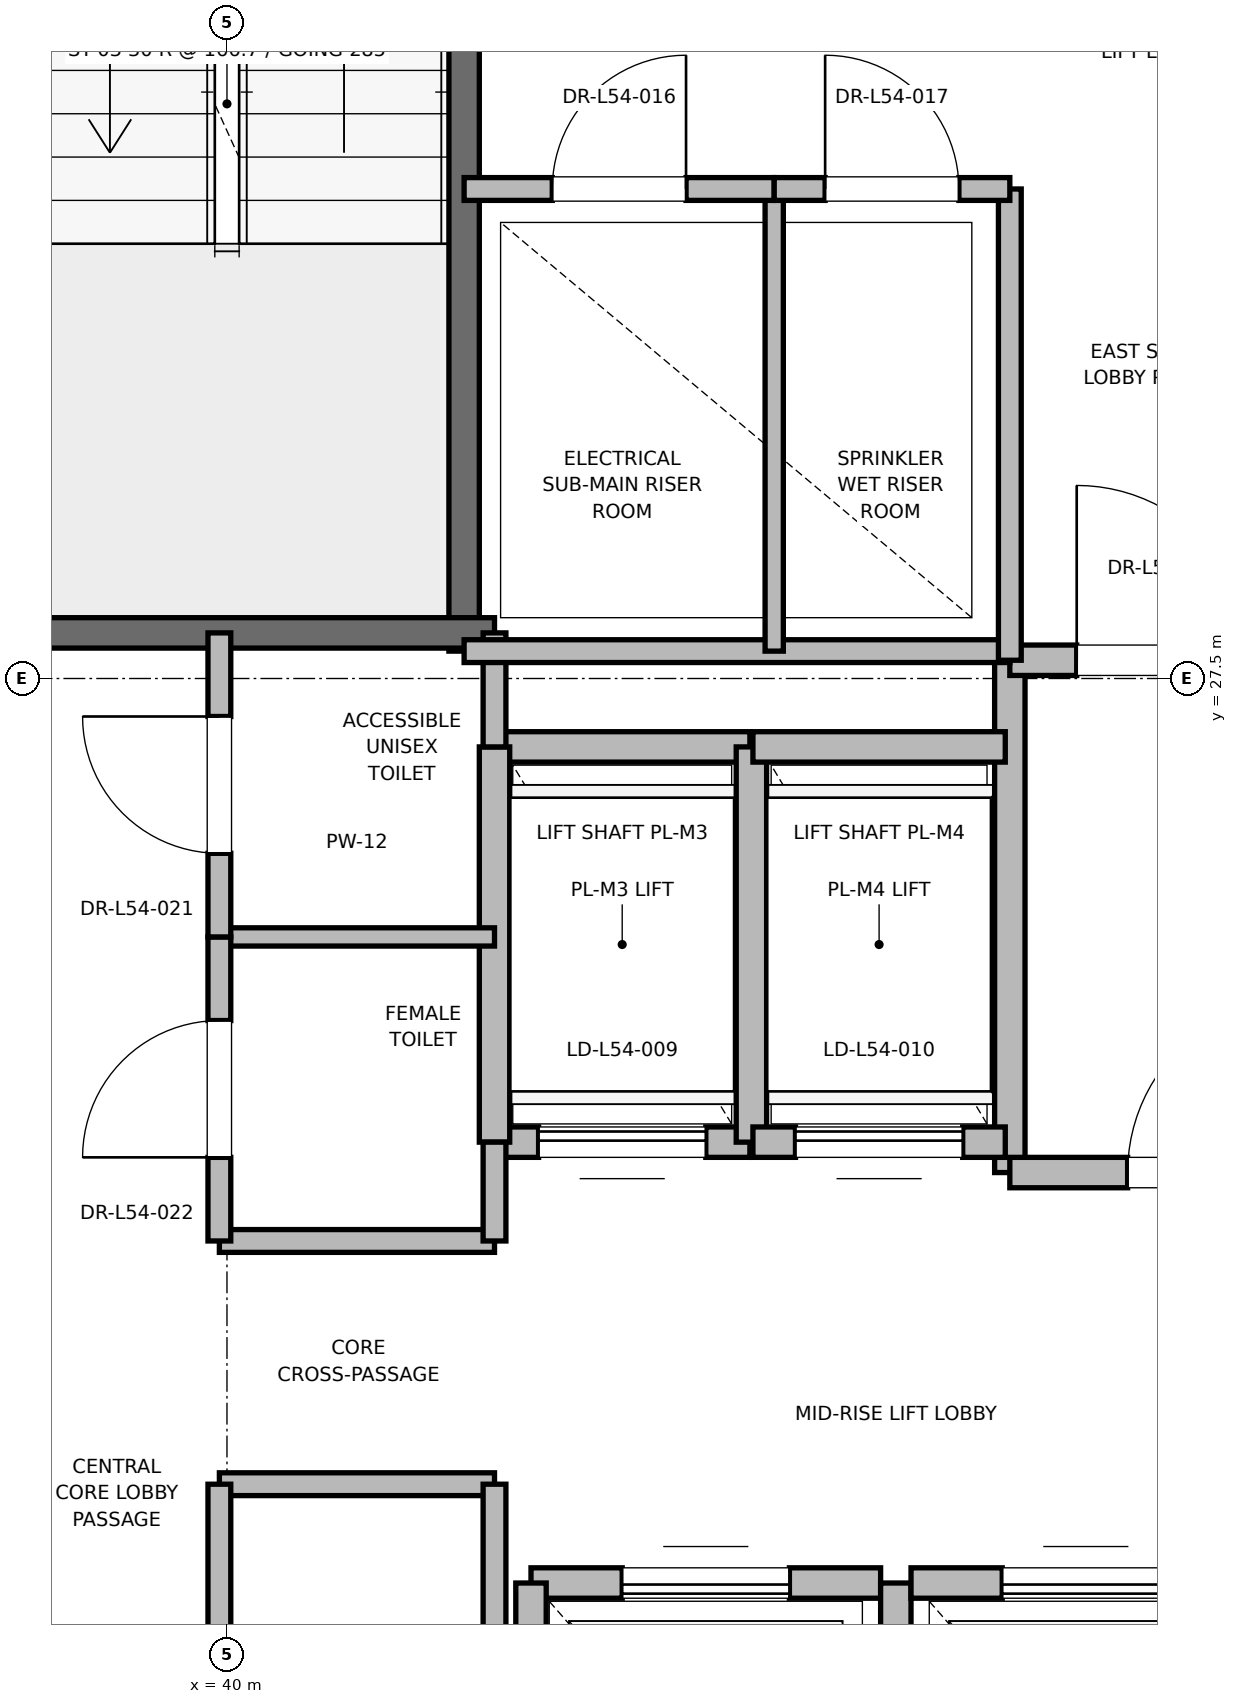
"""IFC4 building model, lengths in metres.
Left out: names, types, materials, properties, quantities, classifications, styles, units other than length and angle.
Written with IfcOpenShell. Run it as: python <this file> out.ifc"""

import sys

from ifc_helpers import new_model, si_unit, direction, frame, frame_2d, origin, place, context, subcontext, project, spatial, rectangle, extrude, element, fill, save


model = new_model("IFC4")
c1 = context("Model", 3, precision=1e-05, world=origin(), true_north=direction((0.0, 1.0)))
c2 = subcontext(c1, "Body", "Model", "MODEL_VIEW")
j1 = project(units=[si_unit("LENGTHUNIT", "METRE"), si_unit("PLANEANGLEUNIT", "RADIAN")], contexts=[c1])
p1 = place(None, origin())
s1 = spatial("IfcSite", under=j1, at=p1, CompositionType="ELEMENT")
p2 = place(p1, origin())
s2 = spatial("IfcBuilding", under=s1, at=p2, CompositionType="ELEMENT")
p3 = place(p2, frame((0.0, 0.0, 233.2)))
s3 = spatial("IfcBuildingStorey", under=s2, at=p3, CompositionType="ELEMENT", Elevation=233.2)
p4 = place(p3, frame((41.56, 27.68, 0.0), z_axis=(0.0, 0.0, 1.0), x_axis=(0.0, 1.0, 0.0)))
e1 = element("IfcWall", 1, at=p4, inside=s3, PredefinedType="SOLIDWALL", context=c2, shape_type="SweptSolid", body=[
    extrude(rectangle(XDim=8.57, YDim=0.2, at=frame_2d((4.285, 0.0))), origin(), (0.0, 0.0, 1.0), 4.7),
])
p5 = place(p3, frame((38.44, 27.8, 0.0), z_axis=(0.0, 0.0, 1.0), x_axis=(1.0, 0.0, 0.0)))
e2 = element("IfcWall", 2, at=p5, inside=s3, PredefinedType="SOLIDWALL", context=c2, shape_type="SweptSolid", body=[
    extrude(rectangle(XDim=3.32, YDim=0.2, at=frame_2d((1.66, 0.0))), origin(), (0.0, 0.0, 1.0), 4.7),
])
p6 = place(p3, frame((45.15, 24.25, 0.0), z_axis=(0.0, 0.0, 1.0), x_axis=(0.0, 1.0, 0.0)))
e3 = element("IfcWall", 3, at=p6, inside=s3, PredefinedType="PARTITIONING", context=c2, shape_type="SweptSolid", body=[
    extrude(rectangle(XDim=3.37, YDim=0.2, at=frame_2d((1.685, 0.0))), origin(), (0.0, 0.0, 1.0), 4.7),
])
p7 = place(p3, frame((45.15, 24.25, 0.0), z_axis=(0.0, 0.0, 1.0), x_axis=(1.0, 0.0, 0.0)))
e4 = element("IfcWall", 4, at=p7, inside=s3, PredefinedType="PARTITIONING", context=c2, shape_type="SweptSolid", body=[
    extrude(rectangle(XDim=2.7, YDim=0.2, at=frame_2d((1.35, 0.0))), origin(), (0.0, 0.0, 1.0), 4.7),
])
p8 = place(p7, frame((0.775, 0.0, 0.0)))
e5 = element("IfcOpeningElement", 5, at=p8, cuts=e4, PredefinedType="OPENING", context=c2, shape_type="SweptSolid", body=[
    extrude(rectangle(XDim=1.15, YDim=2.2, at=frame_2d((0.575, 1.1))), frame((0.0, 0.1, 0.0), z_axis=(0.0, -1.0, 0.0), x_axis=(1.0, 0.0, 0.0)), (0.0, 0.0, 1.0), 0.2),
])
p9 = place(p3, frame((45.15, 27.62, 0.0), z_axis=(0.0, 0.0, 1.0), x_axis=(1.0, 0.0, 0.0)))
e6 = element("IfcWall", 6, at=p9, inside=s3, PredefinedType="PARTITIONING", context=c2, shape_type="SweptSolid", body=[
    extrude(rectangle(XDim=2.03, YDim=0.2, at=frame_2d((1.015, 0.0))), origin(), (0.0, 0.0, 1.0), 4.7),
])
p10 = place(p9, frame((0.44, 0.0, 0.0)))
e7 = element("IfcOpeningElement", 7, at=p10, cuts=e6, PredefinedType="OPENING", context=c2, shape_type="SweptSolid", body=[
    extrude(rectangle(XDim=1.15, YDim=2.2, at=frame_2d((0.575, 1.1))), frame((0.0, 0.1, 0.0), z_axis=(0.0, -1.0, 0.0), x_axis=(1.0, 0.0, 0.0)), (0.0, 0.0, 1.0), 0.2),
])
p11 = place(p3, frame((44.3, 21.55, 0.0), z_axis=(0.0, 0.0, 1.0), x_axis=(-1.0, 0.0, 0.0)))
e8 = element("IfcWall", 8, at=p11, inside=s3, PredefinedType="SOLIDWALL", context=c2, shape_type="SweptSolid", body=[
    extrude(rectangle(XDim=2.3, YDim=0.2, at=frame_2d((1.15, 0.0))), origin(), (0.0, 0.0, 1.0), 4.7),
])
p12 = place(p11, frame((0.6, 0.0, 0.0)))
e9 = element("IfcOpeningElement", 9, at=p12, cuts=e8, PredefinedType="OPENING", context=c2, shape_type="SweptSolid", body=[
    extrude(rectangle(XDim=1.1, YDim=2.2, at=frame_2d((0.55, 1.1))), frame((0.0, 0.1, 0.0), z_axis=(0.0, -1.0, 0.0), x_axis=(1.0, 0.0, 0.0)), (0.0, 0.0, 1.0), 0.2),
])
p13 = place(p3, frame((42.0, 21.55, 0.0), z_axis=(0.0, 0.0, 1.0), x_axis=(0.0, -1.0, 0.0)))
e10 = element("IfcWall", 10, at=p13, inside=s3, PredefinedType="SOLIDWALL", context=c2, shape_type="SweptSolid", body=[
    extrude(rectangle(XDim=2.6, YDim=0.2, at=frame_2d((1.3, 0.0))), origin(), (0.0, 0.0, 1.0), 3.68),
])
p14 = place(p3, frame((44.4, 18.95, 0.0), z_axis=(0.0, 0.0, 1.0), x_axis=(0.0, 1.0, 0.0)))
e11 = element("IfcWall", 11, at=p14, inside=s3, PredefinedType="SOLIDWALL", context=c2, shape_type="SweptSolid", body=[
    extrude(rectangle(XDim=2.6, YDim=0.2, at=frame_2d((1.3, 0.0))), origin(), (0.0, 0.0, 1.0), 4.7),
])
p15 = place(p3, frame((46.8, 21.55, 0.0), z_axis=(0.0, 0.0, 1.0), x_axis=(-1.0, 0.0, 0.0)))
e12 = element("IfcWall", 12, at=p15, inside=s3, PredefinedType="SOLIDWALL", context=c2, shape_type="SweptSolid", body=[
    extrude(rectangle(XDim=2.3, YDim=0.2, at=frame_2d((1.15, 0.0))), origin(), (0.0, 0.0, 1.0), 4.7),
])
p16 = place(p15, frame((0.6, 0.0, 0.0)))
e13 = element("IfcOpeningElement", 13, at=p16, cuts=e12, PredefinedType="OPENING", context=c2, shape_type="SweptSolid", body=[
    extrude(rectangle(XDim=1.1, YDim=2.2, at=frame_2d((0.55, 1.1))), frame((0.0, 0.1, 0.0), z_axis=(0.0, -1.0, 0.0), x_axis=(1.0, 0.0, 0.0)), (0.0, 0.0, 1.0), 0.2),
])
p17 = place(p3, frame((41.76, 24.45, 0.0), z_axis=(0.0, 0.0, 1.0), x_axis=(1.0, 0.0, 0.0)))
e14 = element("IfcWall", 14, at=p17, inside=s3, PredefinedType="SOLIDWALL", context=c2, shape_type="SweptSolid", body=[
    extrude(rectangle(XDim=1.68, YDim=0.2, at=frame_2d((0.84, 0.0))), origin(), (0.0, 0.0, 1.0), 4.7),
])
p18 = place(p17, frame((0.29, 0.0, 0.0)))
e15 = element("IfcOpeningElement", 15, at=p18, cuts=e14, PredefinedType="OPENING", context=c2, shape_type="SweptSolid", body=[
    extrude(rectangle(XDim=1.1, YDim=2.2, at=frame_2d((0.55, 1.1))), frame((0.0, 0.1, 0.0), z_axis=(0.0, -1.0, 0.0), x_axis=(1.0, 0.0, 0.0)), (0.0, 0.0, 1.0), 0.2),
])
p19 = place(p3, frame((43.44, 27.05, 0.0), z_axis=(0.0, 0.0, 1.0), x_axis=(-1.0, 0.0, 0.0)))
e16 = element("IfcWall", 16, at=p19, inside=s3, PredefinedType="SOLIDWALL", context=c2, shape_type="SweptSolid", body=[
    extrude(rectangle(XDim=1.68, YDim=0.2, at=frame_2d((0.84, 0.0))), origin(), (0.0, 0.0, 1.0), 4.7),
])
for number, where, z_axis, x_axis in (
    (17, (41.76, 27.05, 0.0), (0.0, 0.0, 1.0), (0.0, -1.0, 0.0)),
    (18, (43.45, 24.45, 0.0), (0.0, 0.0, 1.0), (0.0, 1.0, 0.0)),
):
    element("IfcWall", number, at=place(p3, frame(where, z_axis=z_axis, x_axis=x_axis)), inside=s3, PredefinedType="SOLIDWALL", context=c2, shape_type="SweptSolid", body=[
        extrude(rectangle(XDim=2.6, YDim=0.2, at=frame_2d((1.3, 0.0))), origin(), (0.0, 0.0, 1.0), 4.7),
    ])
p20 = place(p3, frame((43.46, 24.45, 0.0), z_axis=(0.0, 0.0, 1.0), x_axis=(1.0, 0.0, 0.0)))
e19 = element("IfcWall", 19, at=p20, inside=s3, PredefinedType="SOLIDWALL", context=c2, shape_type="SweptSolid", body=[
    extrude(rectangle(XDim=1.66, YDim=0.2, at=frame_2d((0.83, 0.0))), origin(), (0.0, 0.0, 1.0), 4.7),
])
p21 = place(p20, frame((0.28, 0.0, 0.0)))
e20 = element("IfcOpeningElement", 20, at=p21, cuts=e19, PredefinedType="OPENING", context=c2, shape_type="SweptSolid", body=[
    extrude(rectangle(XDim=1.1, YDim=2.2, at=frame_2d((0.55, 1.1))), frame((0.0, 0.1, 0.0), z_axis=(0.0, -1.0, 0.0), x_axis=(1.0, 0.0, 0.0)), (0.0, 0.0, 1.0), 0.2),
])
p22 = place(p3, frame((45.12, 27.05, 0.0), z_axis=(0.0, 0.0, 1.0), x_axis=(-1.0, 0.0, 0.0)))
e21 = element("IfcWall", 21, at=p22, inside=s3, PredefinedType="SOLIDWALL", context=c2, shape_type="SweptSolid", body=[
    extrude(rectangle(XDim=1.66, YDim=0.2, at=frame_2d((0.83, 0.0))), origin(), (0.0, 0.0, 1.0), 4.7),
])
for number, where, z_axis, x_axis in (
    (22, (39.95, 22.2, 0.0), (0.0, 0.0, 1.0), (1.0, 0.0, 0.0)),
    (23, (39.95, 23.8, 0.0), (0.0, 0.0, 1.0), (1.0, 0.0, 0.0)),
):
    element("IfcWall", number, at=place(p3, frame(where, z_axis=z_axis, x_axis=x_axis)), inside=s3, PredefinedType="PARTITIONING", context=c2, shape_type="SweptSolid", body=[
        extrude(rectangle(XDim=1.81, YDim=0.15, at=frame_2d((0.905, 0.0))), origin(), (0.0, 0.0, 1.0), 2.85),
    ])
p23 = place(p3, frame((39.95, 25.8, 0.0), z_axis=(0.0, 0.0, 1.0), x_axis=(1.0, 0.0, 0.0)))
e24 = element("IfcWall", 24, at=p23, inside=s3, PredefinedType="PARTITIONING", context=c2, shape_type="SweptSolid", body=[
    extrude(rectangle(XDim=1.81, YDim=0.12, at=frame_2d((0.905, 0.0))), origin(), (0.0, 0.0, 1.0), 2.85),
])
p24 = place(p3, frame((41.76, 18.6, 0.0), z_axis=(0.0, 0.0, 1.0), x_axis=(0.0, 1.0, 0.0)))
e25 = element("IfcWall", 25, at=p24, inside=s3, PredefinedType="PARTITIONING", context=c2, shape_type="SweptSolid", body=[
    extrude(rectangle(XDim=3.6, YDim=0.15, at=frame_2d((1.8, 0.0))), origin(), (0.0, 0.0, 1.0), 2.85),
])
p25 = place(p3, frame((41.76, 23.8, 0.0), z_axis=(0.0, 0.0, 1.0), x_axis=(0.0, 1.0, 0.0)))
e26 = element("IfcWall", 26, at=p25, inside=s3, PredefinedType="PARTITIONING", context=c2, shape_type="SweptSolid", body=[
    extrude(rectangle(XDim=0.65, YDim=0.15, at=frame_2d((0.325, 0.0))), origin(), (0.0, 0.0, 1.0), 2.85),
])
p26 = place(p3, frame((41.76, 27.05, 0.0), z_axis=(0.0, 0.0, 1.0), x_axis=(0.0, 1.0, 0.0)))
e27 = element("IfcWall", 27, at=p26, inside=s3, PredefinedType="PARTITIONING", context=c2, shape_type="SweptSolid", body=[
    extrude(rectangle(XDim=0.75, YDim=0.15, at=frame_2d((0.375, 0.0))), origin(), (0.0, 0.0, 1.0), 2.85),
])
p27 = place(p3, frame((39.95, 19.2, 0.0), z_axis=(0.0, 0.0, 1.0), x_axis=(0.0, 1.0, 0.0)))
e28 = element("IfcWall", 28, at=p27, inside=s3, PredefinedType="PARTITIONING", context=c2, shape_type="SweptSolid", body=[
    extrude(rectangle(XDim=3.0, YDim=0.15, at=frame_2d((1.5, 0.0))), origin(), (0.0, 0.0, 1.0), 2.85),
])
p28 = place(p27, frame((1.05, 0.0, 0.0)))
e29 = element("IfcOpeningElement", 29, at=p28, cuts=e28, PredefinedType="OPENING", context=c2, shape_type="SweptSolid", body=[
    extrude(rectangle(XDim=0.9, YDim=2.1, at=frame_2d((0.45, 1.05))), frame((0.0, 0.075, 0.0), z_axis=(0.0, -1.0, 0.0), x_axis=(1.0, 0.0, 0.0)), (0.0, 0.0, 1.0), 0.15),
])
p29 = place(p3, frame((39.95, 23.8, 0.0), z_axis=(0.0, 0.0, 1.0), x_axis=(0.0, 1.0, 0.0)))
e30 = element("IfcWall", 30, at=p29, inside=s3, PredefinedType="PARTITIONING", context=c2, shape_type="SweptSolid", body=[
    extrude(rectangle(XDim=2.0, YDim=0.15, at=frame_2d((1.0, 0.0))), origin(), (0.0, 0.0, 1.0), 2.85),
])
p30 = place(p29, frame((0.55, 0.0, 0.0)))
e31 = element("IfcOpeningElement", 31, at=p30, cuts=e30, PredefinedType="OPENING", context=c2, shape_type="SweptSolid", body=[
    extrude(rectangle(XDim=0.9, YDim=2.1, at=frame_2d((0.45, 1.05))), frame((0.0, 0.075, 0.0), z_axis=(0.0, -1.0, 0.0), x_axis=(1.0, 0.0, 0.0)), (0.0, 0.0, 1.0), 0.15),
])
p31 = place(p3, frame((39.95, 25.8, 0.0), z_axis=(0.0, 0.0, 1.0), x_axis=(0.0, 1.0, 0.0)))
e32 = element("IfcWall", 32, at=p31, inside=s3, PredefinedType="PARTITIONING", context=c2, shape_type="SweptSolid", body=[
    extrude(rectangle(XDim=2.0, YDim=0.15, at=frame_2d((1.0, 0.0))), origin(), (0.0, 0.0, 1.0), 2.85),
])
p32 = place(p31, frame((0.55, 0.0, 0.0)))
e33 = element("IfcOpeningElement", 33, at=p32, cuts=e32, PredefinedType="OPENING", context=c2, shape_type="SweptSolid", body=[
    extrude(rectangle(XDim=0.9, YDim=2.1, at=frame_2d((0.45, 1.05))), frame((0.0, 0.075, 0.0), z_axis=(0.0, -1.0, 0.0), x_axis=(1.0, 0.0, 0.0)), (0.0, 0.0, 1.0), 0.15),
])
p33 = place(p3, frame((41.56, 27.68, 0.0), z_axis=(0.0, 0.0, 1.0), x_axis=(1.0, 0.0, 0.0)))
e34 = element("IfcWall", 34, at=p33, inside=s3, PredefinedType="PARTITIONING", context=c2, shape_type="SweptSolid", body=[
    extrude(rectangle(XDim=3.59, YDim=0.15, at=frame_2d((1.795, 0.0))), origin(), (0.0, 0.0, 1.0), 2.85),
])
p34 = place(p3, frame((45.15, 27.62, 0.0), z_axis=(0.0, 0.0, 1.0), x_axis=(0.0, 1.0, 0.0)))
e35 = element("IfcWall", 35, at=p34, inside=s3, PredefinedType="PARTITIONING", context=c2, shape_type="SweptSolid", body=[
    extrude(rectangle(XDim=3.1, YDim=0.15, at=frame_2d((1.55, 0.0))), origin(), (0.0, 0.0, 1.0), 2.85),
])
p35 = place(p3, frame((43.6, 27.68, 0.0), z_axis=(0.0, 0.0, 1.0), x_axis=(0.0, 1.0, 0.0)))
e36 = element("IfcWall", 36, at=p35, inside=s3, PredefinedType="PARTITIONING", context=c2, shape_type="SweptSolid", body=[
    extrude(rectangle(XDim=3.04, YDim=0.12, at=frame_2d((1.52, 0.0))), origin(), (0.0, 0.0, 1.0), 2.85),
])
p36 = place(p3, frame((41.56, 30.72, 0.0), z_axis=(0.0, 0.0, 1.0), x_axis=(1.0, 0.0, 0.0)))
e37 = element("IfcWall", 37, at=p36, inside=s3, PredefinedType="PARTITIONING", context=c2, shape_type="SweptSolid", body=[
    extrude(rectangle(XDim=2.04, YDim=0.15, at=frame_2d((1.02, 0.0))), origin(), (0.0, 0.0, 1.0), 2.85),
])
p37 = place(p36, frame((0.58, 0.0, 0.0)))
e38 = element("IfcOpeningElement", 38, at=p37, cuts=e37, PredefinedType="OPENING", context=c2, shape_type="SweptSolid", body=[
    extrude(rectangle(XDim=0.88, YDim=2.1, at=frame_2d((0.44, 1.05))), frame((0.0, 0.075, 0.0), z_axis=(0.0, -1.0, 0.0), x_axis=(1.0, 0.0, 0.0)), (0.0, 0.0, 1.0), 0.15),
])
p38 = place(p3, frame((43.6, 30.72, 0.0), z_axis=(0.0, 0.0, 1.0), x_axis=(1.0, 0.0, 0.0)))
e39 = element("IfcWall", 39, at=p38, inside=s3, PredefinedType="PARTITIONING", context=c2, shape_type="SweptSolid", body=[
    extrude(rectangle(XDim=1.55, YDim=0.15, at=frame_2d((0.775, 0.0))), origin(), (0.0, 0.0, 1.0), 2.85),
])
p39 = place(p38, frame((0.335, 0.0, 0.0)))
e40 = element("IfcOpeningElement", 40, at=p39, cuts=e39, PredefinedType="OPENING", context=c2, shape_type="SweptSolid", body=[
    extrude(rectangle(XDim=0.88, YDim=2.1, at=frame_2d((0.44, 1.05))), frame((0.0, 0.075, 0.0), z_axis=(0.0, -1.0, 0.0), x_axis=(1.0, 0.0, 0.0)), (0.0, 0.0, 1.0), 0.15),
])
p40 = place(p8, origin())
e41 = element("IfcDoor", 41, at=p40, inside=s3, OperationType="SINGLE_SWING_RIGHT", PredefinedType="DOOR", context=c2, shape_type="SweptSolid", body=[
    extrude(rectangle(XDim=1.15, YDim=2.2, at=frame_2d((0.575, 1.1))), frame((0.0, 0.025, 0.0), z_axis=(0.0, -1.0, 0.0), x_axis=(1.0, 0.0, 0.0)), (0.0, 0.0, 1.0), 0.05),
])
fill(e5, e41)
p41 = place(p10, origin())
e42 = element("IfcDoor", 42, at=p41, inside=s3, OperationType="SINGLE_SWING_LEFT", PredefinedType="DOOR", context=c2, shape_type="SweptSolid", body=[
    extrude(rectangle(XDim=1.15, YDim=2.2, at=frame_2d((0.575, 1.1))), frame((0.0, 0.025, 0.0), z_axis=(0.0, -1.0, 0.0), x_axis=(1.0, 0.0, 0.0)), (0.0, 0.0, 1.0), 0.05),
])
fill(e7, e42)
p42 = place(p12, origin())
e43 = element("IfcDoor", 43, at=p42, inside=s3, OperationType="SLIDING_TO_RIGHT", PredefinedType="DOOR", context=c2, shape_type="SweptSolid", body=[
    extrude(rectangle(XDim=1.1, YDim=2.2, at=frame_2d((0.55, 1.1))), frame((0.0, 0.025, 0.0), z_axis=(0.0, -1.0, 0.0), x_axis=(1.0, 0.0, 0.0)), (0.0, 0.0, 1.0), 0.05),
])
fill(e9, e43)
p43 = place(p16, origin())
e44 = element("IfcDoor", 44, at=p43, inside=s3, OperationType="SLIDING_TO_RIGHT", PredefinedType="DOOR", context=c2, shape_type="SweptSolid", body=[
    extrude(rectangle(XDim=1.1, YDim=2.2, at=frame_2d((0.55, 1.1))), frame((0.0, 0.025, 0.0), z_axis=(0.0, -1.0, 0.0), x_axis=(1.0, 0.0, 0.0)), (0.0, 0.0, 1.0), 0.05),
])
fill(e13, e44)
p44 = place(p18, origin())
e45 = element("IfcDoor", 45, at=p44, inside=s3, OperationType="SLIDING_TO_RIGHT", PredefinedType="DOOR", context=c2, shape_type="SweptSolid", body=[
    extrude(rectangle(XDim=1.1, YDim=2.2, at=frame_2d((0.55, 1.1))), frame((0.0, 0.025, 0.0), z_axis=(0.0, -1.0, 0.0), x_axis=(1.0, 0.0, 0.0)), (0.0, 0.0, 1.0), 0.05),
])
fill(e15, e45)
p45 = place(p21, origin())
e46 = element("IfcDoor", 46, at=p45, inside=s3, OperationType="SLIDING_TO_RIGHT", PredefinedType="DOOR", context=c2, shape_type="SweptSolid", body=[
    extrude(rectangle(XDim=1.1, YDim=2.2, at=frame_2d((0.55, 1.1))), frame((0.0, 0.025, 0.0), z_axis=(0.0, -1.0, 0.0), x_axis=(1.0, 0.0, 0.0)), (0.0, 0.0, 1.0), 0.05),
])
fill(e20, e46)
p46 = place(p30, origin())
e47 = element("IfcDoor", 47, at=p46, inside=s3, OperationType="SINGLE_SWING_LEFT", PredefinedType="DOOR", context=c2, shape_type="SweptSolid", body=[
    extrude(rectangle(XDim=0.9, YDim=2.1, at=frame_2d((0.45, 1.05))), frame((0.0, 0.025, 0.0), z_axis=(0.0, -1.0, 0.0), x_axis=(1.0, 0.0, 0.0)), (0.0, 0.0, 1.0), 0.05),
])
fill(e31, e47)
p47 = place(p32, origin())
e48 = element("IfcDoor", 48, at=p47, inside=s3, OperationType="SINGLE_SWING_RIGHT", PredefinedType="DOOR", context=c2, shape_type="SweptSolid", body=[
    extrude(rectangle(XDim=0.9, YDim=2.1, at=frame_2d((0.45, 1.05))), frame((0.0, 0.025, 0.0), z_axis=(0.0, -1.0, 0.0), x_axis=(1.0, 0.0, 0.0)), (0.0, 0.0, 1.0), 0.05),
])
fill(e33, e48)
p48 = place(p37, origin())
e49 = element("IfcDoor", 49, at=p48, inside=s3, OperationType="SINGLE_SWING_RIGHT", PredefinedType="DOOR", context=c2, shape_type="SweptSolid", body=[
    extrude(rectangle(XDim=0.88, YDim=2.1, at=frame_2d((0.44, 1.05))), frame((0.0, 0.025, 0.0), z_axis=(0.0, -1.0, 0.0), x_axis=(1.0, 0.0, 0.0)), (0.0, 0.0, 1.0), 0.05),
])
fill(e38, e49)
p49 = place(p39, origin())
e50 = element("IfcDoor", 50, at=p49, inside=s3, OperationType="SINGLE_SWING_LEFT", PredefinedType="DOOR", context=c2, shape_type="SweptSolid", body=[
    extrude(rectangle(XDim=0.88, YDim=2.1, at=frame_2d((0.44, 1.05))), frame((0.0, 0.025, 0.0), z_axis=(0.0, -1.0, 0.0), x_axis=(1.0, 0.0, 0.0)), (0.0, 0.0, 1.0), 0.05),
])
fill(e40, e50)
save(model, sys.argv[1])
